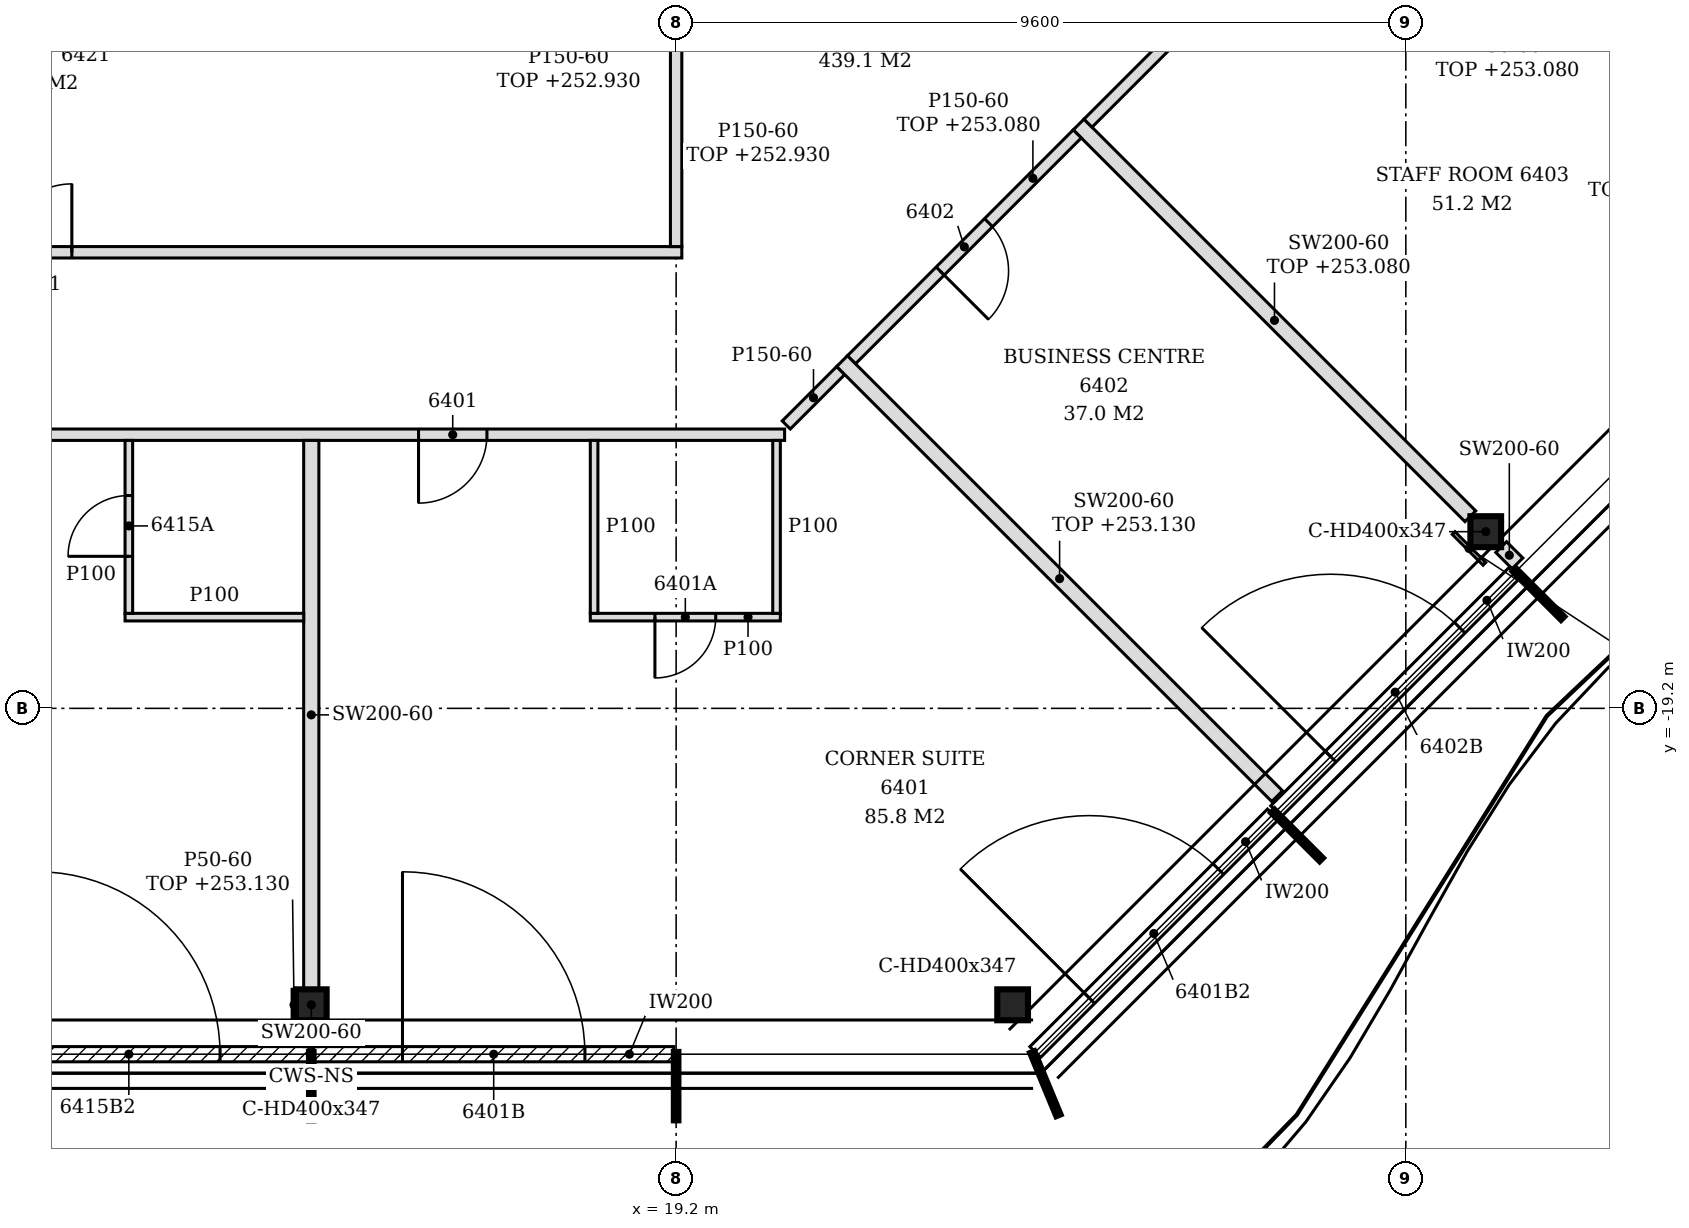
"""IFC4 building model, lengths in metres.
Left out: names, types, materials, properties, quantities, classifications, styles, units other than length and angle.
Written with IfcOpenShell. Run it as: python <this file> out.ifc"""

import sys

from ifc_helpers import new_model, si_unit, direction, frame, frame_2d, origin, origin_2d, place, context, subcontext, project, spatial, polyline, rectangle, i_section, outline, extrude, element, fill, save


model = new_model("IFC4")
c1 = context("Model", 3, precision=1e-05, world=origin(), true_north=direction((0.0, 1.0)))
c2 = subcontext(c1, "Body", "Model", "MODEL_VIEW")
j1 = project(units=[si_unit("LENGTHUNIT", "METRE"), si_unit("PLANEANGLEUNIT", "RADIAN")], contexts=[c1])
p1 = place(None, origin())
s1 = spatial("IfcSite", under=j1, at=p1, CompositionType="ELEMENT")
p2 = place(p1, origin())
s2 = spatial("IfcBuilding", under=s1, at=p2, CompositionType="ELEMENT")
p3 = place(p2, frame((0.0, 0.0, 250.2)))
s3 = spatial("IfcBuildingStorey", under=s2, at=p3, CompositionType="ELEMENT", Elevation=250.2)
for number, where, z_axis, x_axis in (
    (1, (14.4, -23.1, -0.15), (0.0, 0.0, 1.0), (1.0, 0.0, 0.0)),
    (2, (23.627, -23.1, -0.15), (0.0, 0.0, 1.0), (1.0, 0.0, 0.0)),
    (3, (29.852, -16.876, -0.15), (0.0, 0.0, 1.0), (1.0, 0.0, 0.0)),
):
    element("IfcColumn", number, at=place(p3, frame(where, z_axis=z_axis, x_axis=x_axis)), inside=s3, PredefinedType="COLUMN", context=c2, shape_type="SweptSolid", body=[
        extrude(i_section(OverallWidth=0.404, OverallDepth=0.407, WebThickness=0.027, FlangeThickness=0.044, FilletRadius=0.015, at=origin_2d()), origin(), (0.0, 0.0, 1.0), 3.6),
    ])
p4 = place(p3, frame((9.63, -23.75, 0.0), z_axis=(0.0, 0.0, 1.0), x_axis=(1.0, 0.0, 0.0)))
e4 = element("IfcWall", 4, at=p4, inside=s3, PredefinedType="NOTDEFINED", context=c2, shape_type="SweptSolid", body=[
    extrude(rectangle(XDim=4.74, YDim=0.2, at=frame_2d((2.37, 0.0))), origin(), (0.0, 0.0, 1.0), 3.45),
])
p5 = place(p4, frame((1.17, 0.0, 0.0)))
e5 = element("IfcOpeningElement", 5, at=p5, cuts=e4, PredefinedType="OPENING", context=c2, shape_type="SweptSolid", body=[
    extrude(rectangle(XDim=2.4, YDim=2.4, at=frame_2d((1.2, 1.2))), frame((0.0, 0.11, 0.0), z_axis=(0.0, -1.0, 0.0), x_axis=(1.0, 0.0, 0.0)), (0.0, 0.0, 1.0), 0.22),
])
p6 = place(p3, frame((14.43, -23.75, 0.0), z_axis=(0.0, 0.0, 1.0), x_axis=(1.0, 0.0, 0.0)))
e6 = element("IfcWall", 6, at=p6, inside=s3, PredefinedType="NOTDEFINED", context=c2, shape_type="SweptSolid", body=[
    extrude(rectangle(XDim=4.74, YDim=0.2, at=frame_2d((2.37, 0.0))), origin(), (0.0, 0.0, 1.0), 3.45),
])
p7 = place(p6, frame((1.17, 0.0, 0.0)))
e7 = element("IfcOpeningElement", 7, at=p7, cuts=e6, PredefinedType="OPENING", context=c2, shape_type="SweptSolid", body=[
    extrude(rectangle(XDim=2.4, YDim=2.4, at=frame_2d((1.2, 1.2))), frame((0.0, 0.11, 0.0), z_axis=(0.0, -1.0, 0.0), x_axis=(1.0, 0.0, 0.0)), (0.0, 0.0, 1.0), 0.22),
])
p8 = place(p3, frame((23.925, -23.722, 0.0), z_axis=(0.0, 0.0, 1.0), x_axis=(0.707106781187, 0.707106781187, 0.0)))
e8 = element("IfcWall", 8, at=p8, inside=s3, PredefinedType="NOTDEFINED", context=c2, shape_type="SweptSolid", body=[
    extrude(rectangle(XDim=4.421, YDim=0.2, at=frame_2d((2.21, 0.0))), origin(), (0.0, 0.0, 1.0), 3.45),
])
p9 = place(p8, frame((1.005, 0.0, 0.0)))
e9 = element("IfcOpeningElement", 9, at=p9, cuts=e8, PredefinedType="OPENING", context=c2, shape_type="SweptSolid", body=[
    extrude(rectangle(XDim=2.4, YDim=2.4, at=frame_2d((1.2, 1.2))), frame((0.0, 0.11, 0.0), z_axis=(0.0, -1.0, 0.0), x_axis=(1.0, 0.0, 0.0)), (0.0, 0.0, 1.0), 0.22),
])
p10 = place(p3, frame((27.093, -20.553, 0.0), z_axis=(0.0, 0.0, 1.0), x_axis=(0.707079231393, 0.707134329907, 0.0)))
e10 = element("IfcWall", 10, at=p10, inside=s3, PredefinedType="NOTDEFINED", context=c2, shape_type="SweptSolid", body=[
    extrude(rectangle(XDim=4.431, YDim=0.2, at=frame_2d((2.215, 0.0))), origin(), (0.0, 0.0, 1.0), 3.45),
])
p11 = place(p10, frame((1.015, 0.0, 0.0)))
e11 = element("IfcOpeningElement", 11, at=p11, cuts=e10, PredefinedType="OPENING", context=c2, shape_type="SweptSolid", body=[
    extrude(rectangle(XDim=2.4, YDim=2.4, at=frame_2d((1.2, 1.2))), frame((0.0, 0.11, 0.0), z_axis=(0.0, -1.0, 0.0), x_axis=(1.0, 0.0, 0.0)), (0.0, 0.0, 1.0), 0.22),
])
p12 = place(p3, frame((14.4, -23.65, 0.0), z_axis=(0.0, 0.0, 1.0), x_axis=(0.0, 1.0, 0.0)))
e12 = element("IfcWall", 12, at=p12, inside=s3, PredefinedType="PARTITIONING", context=c2, shape_type="SweptSolid", body=[
    extrude(rectangle(XDim=0.346, YDim=0.2, at=frame_2d((0.173, 0.0))), origin(), (0.0, 0.0, 1.0), 3.45),
])
p13 = place(p3, frame((14.4, -22.896, 0.0), z_axis=(0.0, 0.0, 1.0), x_axis=(0.0, 1.0, 0.0)))
e13 = element("IfcWall", 13, at=p13, inside=s3, PredefinedType="PARTITIONING", context=c2, shape_type="SweptSolid", body=[
    extrude(outline(polyline([(0.0, 0.0), (7.221, 0.0), (7.221, 3.45), (3.802, 3.45), (3.8, 2.88), (3.592, 2.88), (3.59, 3.45), (0.0, 3.45), (0.0, 0.0)])), frame((0.0, 0.1, 0.0), z_axis=(0.0, -1.0, 0.0), x_axis=(1.0, 0.0, 0.0)), (0.0, 0.0, 1.0), 0.2),
])
p14 = place(p3, frame((27.107, -20.355, 0.0), z_axis=(0.0, 0.0, 1.0), x_axis=(-0.707182179369, 0.707031374964, 0.0)))
e14 = element("IfcWall", 14, at=p14, inside=s3, PredefinedType="PARTITIONING", context=c2, shape_type="SweptSolid", body=[
    extrude(rectangle(XDim=8.095, YDim=0.2, at=frame_2d((4.047, 0.0))), origin(), (0.0, 0.0, 1.0), 2.93),
])
p15 = place(p3, frame((11.95, -18.0, 0.0), z_axis=(0.0, 0.0, 1.0), x_axis=(1.0, 0.0, 0.0)))
e15 = element("IfcWall", 15, at=p15, inside=s3, PredefinedType="PARTITIONING", context=c2, shape_type="SweptSolid", body=[
    extrude(rectangle(XDim=2.35, YDim=0.1, at=frame_2d((1.175, 0.0))), origin(), (0.0, 0.0, 1.0), 3.45),
])
p16 = place(p3, frame((18.071, -18.0, 0.0), z_axis=(0.0, 0.0, 1.0), x_axis=(1.0, 0.0, 0.0)))
e16 = element("IfcWall", 16, at=p16, inside=s3, PredefinedType="PARTITIONING", context=c2, shape_type="SweptSolid", body=[
    extrude(outline(polyline([(0.0, 0.0), (2.5, 0.0), (2.5, 3.45), (1.279, 3.45), (1.277, 2.73), (0.979, 2.73), (0.977, 3.45), (0.0, 3.45), (0.0, 0.0)])), frame((0.0, 0.05, 0.0), z_axis=(0.0, -1.0, 0.0), x_axis=(1.0, 0.0, 0.0)), (0.0, 0.0, 1.0), 0.1),
])
p17 = place(p16, frame((0.85, 0.0, 0.0)))
e17 = element("IfcOpeningElement", 17, at=p17, cuts=e16, PredefinedType="OPENING", context=c2, shape_type="SweptSolid", body=[
    extrude(rectangle(XDim=0.8, YDim=2.1, at=frame_2d((0.4, 1.05))), frame((0.0, 0.06, 0.0), z_axis=(0.0, -1.0, 0.0), x_axis=(1.0, 0.0, 0.0)), (0.0, 0.0, 1.0), 0.12),
])
p18 = place(p3, frame((12.0, -17.95, 0.0), z_axis=(0.0, 0.0, 1.0), x_axis=(0.0, 1.0, 0.0)))
e18 = element("IfcWall", 18, at=p18, inside=s3, PredefinedType="PARTITIONING", context=c2, shape_type="SweptSolid", body=[
    extrude(rectangle(XDim=2.275, YDim=0.1, at=frame_2d((1.137, 0.0))), origin(), (0.0, 0.0, 1.0), 3.45),
])
p19 = place(p18, frame((0.75, 0.0, 0.0)))
e19 = element("IfcOpeningElement", 19, at=p19, cuts=e18, PredefinedType="OPENING", context=c2, shape_type="SweptSolid", body=[
    extrude(rectangle(XDim=0.8, YDim=2.1, at=frame_2d((0.4, 1.05))), frame((0.0, 0.06, 0.0), z_axis=(0.0, -1.0, 0.0), x_axis=(1.0, 0.0, 0.0)), (0.0, 0.0, 1.0), 0.12),
])
for number, where, z_axis, x_axis in (
    (20, (18.121, -17.95, 0.0), (0.0, 0.0, 1.0), (0.0, 1.0, 0.0)),
    (21, (20.521, -17.95, 0.0), (0.0, 0.0, 1.0), (0.0, 1.0, 0.0)),
):
    element("IfcWall", number, at=place(p3, frame(where, z_axis=z_axis, x_axis=x_axis)), inside=s3, PredefinedType="PARTITIONING", context=c2, shape_type="SweptSolid", body=[
        extrude(rectangle(XDim=2.275, YDim=0.1, at=frame_2d((1.137, 0.0))), origin(), (0.0, 0.0, 1.0), 3.45),
    ])
p20 = place(p3, frame((30.269, -17.293, 0.0), z_axis=(0.0, 0.0, 1.0), x_axis=(-0.707509117806, 0.706704215511, 0.0)))
e22 = element("IfcWall", 22, at=p20, inside=s3, PredefinedType="PARTITIONING", context=c2, shape_type="SweptSolid", body=[
    extrude(rectangle(XDim=0.303, YDim=0.2, at=frame_2d((0.152, 0.0))), origin(), (0.0, 0.0, 1.0), 3.45),
])
p21 = place(p3, frame((29.649, -16.673, 0.0), z_axis=(0.0, 0.0, 1.0), x_axis=(-0.707106781187, 0.707106781187, 0.0)))
e23 = element("IfcWall", 23, at=p21, inside=s3, PredefinedType="PARTITIONING", context=c2, shape_type="SweptSolid", body=[
    extrude(rectangle(XDim=7.289, YDim=0.2, at=frame_2d((3.644, 0.0))), origin(), (0.0, 0.0, 1.0), 2.88),
])
p22 = place(p3, frame((-3.126, -15.6, 0.0), z_axis=(0.0, 0.0, 1.0), x_axis=(1.0, 0.0, 0.0)))
e24 = element("IfcWall", 24, at=p22, inside=s3, PredefinedType="PARTITIONING", context=c2, shape_type="SweptSolid", body=[
    extrude(outline(polyline([(0.0, 0.0), (23.753, 0.0), (23.753, 3.45), (22.476, 3.45), (22.474, 2.73), (22.176, 2.73), (22.174, 3.45), (10.476, 3.45), (10.474, 2.73), (10.176, 2.73), (10.174, 3.45), (1.369, 3.45), (1.367, 2.63), (0.229, 2.63), (0.227, 3.45), (0.0, 3.45), (0.0, 0.0)])), frame((0.0, 0.075, 0.0), z_axis=(0.0, -1.0, 0.0), x_axis=(1.0, 0.0, 0.0)), (0.0, 0.0, 1.0), 0.15),
])
p23 = place(p22, frame((18.937, 0.0, 0.0)))
e25 = element("IfcOpeningElement", 25, at=p23, cuts=e24, PredefinedType="OPENING", context=c2, shape_type="SweptSolid", body=[
    extrude(rectangle(XDim=0.9, YDim=2.1, at=frame_2d((0.45, 1.05))), frame((0.0, 0.085, 0.0), z_axis=(0.0, -1.0, 0.0), x_axis=(1.0, 0.0, 0.0)), (0.0, 0.0, 1.0), 0.17),
])
p24 = place(p22, frame((6.876, 0.0, 0.0)))
e26 = element("IfcOpeningElement", 26, at=p24, cuts=e24, PredefinedType="OPENING", context=c2, shape_type="SweptSolid", body=[
    extrude(rectangle(XDim=0.9, YDim=2.1, at=frame_2d((0.45, 1.05))), frame((0.0, 0.085, 0.0), z_axis=(0.0, -1.0, 0.0), x_axis=(1.0, 0.0, 0.0)), (0.0, 0.0, 1.0), 0.17),
])
p25 = place(p3, frame((20.649, -15.472, 0.0), z_axis=(0.0, 0.0, 1.0), x_axis=(0.707106781187, 0.707106781187, 0.0)))
e27 = element("IfcWall", 27, at=p25, inside=s3, PredefinedType="PARTITIONING", context=c2, shape_type="SweptSolid", body=[
    extrude(rectangle(XDim=1.013, YDim=0.15, at=frame_2d((0.506, 0.0))), origin(), (0.0, 0.0, 1.0), 3.45),
])
p26 = place(p3, frame((21.507, -14.614, 0.0), z_axis=(0.0, 0.0, 1.0), x_axis=(0.706990566745, 0.707222976531, 0.0)))
e28 = element("IfcWall", 28, at=p26, inside=s3, PredefinedType="PARTITIONING", context=c2, shape_type="SweptSolid", body=[
    extrude(rectangle(XDim=4.202, YDim=0.15, at=frame_2d((2.101, 0.0))), origin(), (0.0, 0.0, 1.0), 2.88),
])
p27 = place(p26, frame((1.651, 0.0, 0.0)))
e29 = element("IfcOpeningElement", 29, at=p27, cuts=e28, PredefinedType="OPENING", context=c2, shape_type="SweptSolid", body=[
    extrude(rectangle(XDim=0.9, YDim=2.1, at=frame_2d((0.45, 1.05))), frame((0.0, 0.085, 0.0), z_axis=(0.0, -1.0, 0.0), x_axis=(1.0, 0.0, 0.0)), (0.0, 0.0, 1.0), 0.17),
])
p28 = place(p3, frame((2.325, -13.2, 0.0), z_axis=(0.0, 0.0, 1.0), x_axis=(1.0, 0.0, 0.0)))
e30 = element("IfcWall", 30, at=p28, inside=s3, PredefinedType="PARTITIONING", context=c2, shape_type="SweptSolid", body=[
    extrude(outline(polyline([(0.0, 0.0), (16.95, 0.0), (16.95, 2.73), (16.725, 2.73), (16.723, 3.45), (5.025, 3.45), (5.023, 2.73), (4.725, 2.73), (4.723, 3.45), (0.0, 3.45), (0.0, 0.0)])), frame((0.0, 0.075, 0.0), z_axis=(0.0, -1.0, 0.0), x_axis=(1.0, 0.0, 0.0)), (0.0, 0.0, 1.0), 0.15),
])
p29 = place(p28, frame((8.025, 0.0, 0.0)))
e31 = element("IfcOpeningElement", 31, at=p29, cuts=e30, PredefinedType="OPENING", context=c2, shape_type="SweptSolid", body=[
    extrude(rectangle(XDim=0.9, YDim=2.1, at=frame_2d((0.45, 1.05))), frame((0.0, 0.085, 0.0), z_axis=(0.0, -1.0, 0.0), x_axis=(1.0, 0.0, 0.0)), (0.0, 0.0, 1.0), 0.17),
])
p30 = place(p3, frame((19.2, -13.125, 0.0), z_axis=(0.0, 0.0, 1.0), x_axis=(0.0, 1.0, 0.0)))
e32 = element("IfcWall", 32, at=p30, inside=s3, PredefinedType="PARTITIONING", context=c2, shape_type="SweptSolid", body=[
    extrude(rectangle(XDim=2.71, YDim=0.15, at=frame_2d((1.355, 0.0))), origin(), (0.0, 0.0, 1.0), 2.73),
])
p31 = place(p3, frame((34.581, -12.981, 0.0), z_axis=(0.0, 0.0, 1.0), x_axis=(-0.707133900936, 0.707079660397, 0.0)))
e33 = element("IfcWall", 33, at=p31, inside=s3, PredefinedType="PARTITIONING", context=c2, shape_type="SweptSolid", body=[
    extrude(rectangle(XDim=4.501, YDim=0.2, at=frame_2d((2.25, 0.0))), origin(), (0.0, 0.0, 1.0), 2.63),
])
p32 = place(p3, frame((24.619, -11.501, 0.0), z_axis=(0.0, 0.0, 1.0), x_axis=(0.707106781187, 0.707106781187, 0.0)))
e34 = element("IfcWall", 34, at=p32, inside=s3, PredefinedType="PARTITIONING", context=c2, shape_type="SweptSolid", body=[
    extrude(rectangle(XDim=8.702, YDim=0.15, at=frame_2d((4.351, 0.0))), origin(), (0.0, 0.0, 1.0), 2.88),
])
p33 = place(p32, frame((2.499, 0.0, 0.0)))
e35 = element("IfcOpeningElement", 35, at=p33, cuts=e34, PredefinedType="OPENING", context=c2, shape_type="SweptSolid", body=[
    extrude(rectangle(XDim=0.9, YDim=2.1, at=frame_2d((0.45, 1.05))), frame((0.0, 0.085, 0.0), z_axis=(0.0, -1.0, 0.0), x_axis=(1.0, 0.0, 0.0)), (0.0, 0.0, 1.0), 0.17),
])
p34 = place(p32, frame((6.9, 0.0, 0.0)))
e36 = element("IfcOpeningElement", 36, at=p34, cuts=e34, PredefinedType="OPENING", context=c2, shape_type="SweptSolid", body=[
    extrude(rectangle(XDim=0.9, YDim=2.1, at=frame_2d((0.45, 1.05))), frame((0.0, 0.085, 0.0), z_axis=(0.0, -1.0, 0.0), x_axis=(1.0, 0.0, 0.0)), (0.0, 0.0, 1.0), 0.17),
])
p35 = place(p3, frame((14.173, -23.303, 0.0), z_axis=(0.0, 0.0, 1.0), x_axis=(0.0, 1.0, 0.0)))
e37 = element("IfcWall", 37, at=p35, inside=s3, PredefinedType="PARTITIONING", context=c2, shape_type="SweptSolid", body=[
    extrude(rectangle(XDim=0.407, YDim=0.05, at=frame_2d((0.204, 0.0))), origin(), (0.0, 0.0, 1.0), 2.93),
])
p36 = place(p3, frame((29.834, -17.299, 0.0), z_axis=(0.0, 0.0, 1.0), x_axis=(-0.707106781187, 0.707106781187, 0.0)))
e38 = element("IfcWall", 38, at=p36, inside=s3, PredefinedType="PARTITIONING", context=c2, shape_type="SweptSolid", body=[
    extrude(rectangle(XDim=0.573, YDim=0.05, at=frame_2d((0.287, 0.0))), origin(), (0.0, 0.0, 1.0), 2.93),
])
p37 = place(p5, origin())
e39 = element("IfcDoor", 39, at=p37, inside=s3, OperationType="SINGLE_SWING_LEFT", PredefinedType="DOOR", context=c2, shape_type="SweptSolid", body=[
    extrude(rectangle(XDim=2.4, YDim=2.4, at=frame_2d((1.2, 1.2))), frame((0.0, 0.025, 0.0), z_axis=(0.0, -1.0, 0.0), x_axis=(1.0, 0.0, 0.0)), (0.0, 0.0, 1.0), 0.05),
])
fill(e5, e39)
p38 = place(p7, origin())
e40 = element("IfcDoor", 40, at=p38, inside=s3, OperationType="SINGLE_SWING_LEFT", PredefinedType="DOOR", context=c2, shape_type="SweptSolid", body=[
    extrude(rectangle(XDim=2.4, YDim=2.4, at=frame_2d((1.2, 1.2))), frame((0.0, 0.025, 0.0), z_axis=(0.0, -1.0, 0.0), x_axis=(1.0, 0.0, 0.0)), (0.0, 0.0, 1.0), 0.05),
])
fill(e7, e40)
p39 = place(p9, origin())
e41 = element("IfcDoor", 41, at=p39, inside=s3, OperationType="SINGLE_SWING_LEFT", PredefinedType="DOOR", context=c2, shape_type="SweptSolid", body=[
    extrude(rectangle(XDim=2.4, YDim=2.4, at=frame_2d((1.2, 1.2))), frame((0.0, 0.025, 0.0), z_axis=(0.0, -1.0, 0.0), x_axis=(1.0, 0.0, 0.0)), (0.0, 0.0, 1.0), 0.05),
])
fill(e9, e41)
p40 = place(p11, origin())
e42 = element("IfcDoor", 42, at=p40, inside=s3, OperationType="SINGLE_SWING_LEFT", PredefinedType="DOOR", context=c2, shape_type="SweptSolid", body=[
    extrude(rectangle(XDim=2.4, YDim=2.4, at=frame_2d((1.2, 1.2))), frame((0.0, 0.025, 0.0), z_axis=(0.0, -1.0, 0.0), x_axis=(1.0, 0.0, 0.0)), (0.0, 0.0, 1.0), 0.05),
])
fill(e11, e42)
p41 = place(p23, frame((0.9, 0.0, 0.0), z_axis=(0.0, 0.0, 1.0), x_axis=(-1.0, 0.0, 0.0)))
e43 = element("IfcDoor", 43, at=p41, inside=s3, OperationType="SINGLE_SWING_RIGHT", PredefinedType="DOOR", context=c2, shape_type="SweptSolid", body=[
    extrude(rectangle(XDim=0.9, YDim=2.1, at=frame_2d((0.45, 1.05))), frame((0.0, 0.025, 0.0), z_axis=(0.0, -1.0, 0.0), x_axis=(1.0, 0.0, 0.0)), (0.0, 0.0, 1.0), 0.05),
])
fill(e25, e43)
p42 = place(p17, frame((0.8, 0.0, 0.0), z_axis=(0.0, 0.0, 1.0), x_axis=(-1.0, 0.0, 0.0)))
e44 = element("IfcDoor", 44, at=p42, inside=s3, OperationType="SINGLE_SWING_RIGHT", PredefinedType="DOOR", context=c2, shape_type="SweptSolid", body=[
    extrude(rectangle(XDim=0.8, YDim=2.1, at=frame_2d((0.4, 1.05))), frame((0.0, 0.025, 0.0), z_axis=(0.0, -1.0, 0.0), x_axis=(1.0, 0.0, 0.0)), (0.0, 0.0, 1.0), 0.05),
])
fill(e17, e44)
p43 = place(p27, frame((0.9, 0.0, 0.0), z_axis=(0.0, 0.0, 1.0), x_axis=(-1.0, 0.0, 0.0)))
e45 = element("IfcDoor", 45, at=p43, inside=s3, OperationType="SINGLE_SWING_RIGHT", PredefinedType="DOOR", context=c2, shape_type="SweptSolid", body=[
    extrude(rectangle(XDim=0.9, YDim=2.1, at=frame_2d((0.45, 1.05))), frame((0.0, 0.025, 0.0), z_axis=(0.0, -1.0, 0.0), x_axis=(1.0, 0.0, 0.0)), (0.0, 0.0, 1.0), 0.05),
])
fill(e29, e45)
p44 = place(p19, origin())
e46 = element("IfcDoor", 46, at=p44, inside=s3, OperationType="SINGLE_SWING_LEFT", PredefinedType="DOOR", context=c2, shape_type="SweptSolid", body=[
    extrude(rectangle(XDim=0.8, YDim=2.1, at=frame_2d((0.4, 1.05))), frame((0.0, 0.025, 0.0), z_axis=(0.0, -1.0, 0.0), x_axis=(1.0, 0.0, 0.0)), (0.0, 0.0, 1.0), 0.05),
])
fill(e19, e46)
p45 = place(p29, origin())
e47 = element("IfcDoor", 47, at=p45, inside=s3, OperationType="SINGLE_SWING_RIGHT", PredefinedType="DOOR", context=c2, shape_type="SweptSolid", body=[
    extrude(rectangle(XDim=0.9, YDim=2.1, at=frame_2d((0.45, 1.05))), frame((0.0, 0.025, 0.0), z_axis=(0.0, -1.0, 0.0), x_axis=(1.0, 0.0, 0.0)), (0.0, 0.0, 1.0), 0.05),
])
fill(e31, e47)
save(model, sys.argv[1])
